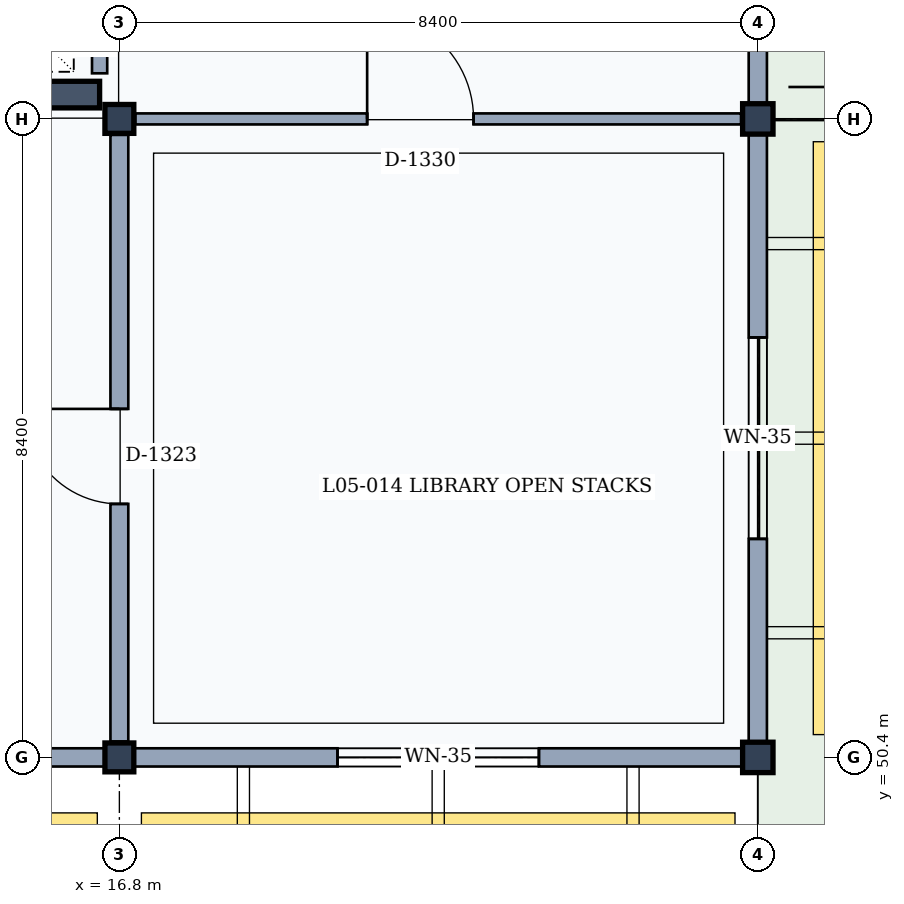
"""IFC4 building model, lengths in metres.
Left out: names, types, materials, properties, quantities, classifications, styles, units other than length and angle.
Written with IfcOpenShell. Run it as: python <this file> out.ifc"""

import sys

from ifc_helpers import new_model, si_unit, direction, frame, frame_2d, origin, origin_2d, place, context, subcontext, project, spatial, rectangle, extrude, element, fill, save


model = new_model("IFC4")
c1 = context("Model", 3, precision=1e-05, world=origin(), true_north=direction((0.0, 1.0)))
c2 = subcontext(c1, "Body", "Model", "MODEL_VIEW")
j1 = project(units=[si_unit("LENGTHUNIT", "METRE"), si_unit("PLANEANGLEUNIT", "RADIAN")], contexts=[c1])
p1 = place(None, origin())
s1 = spatial("IfcSite", under=j1, at=p1, CompositionType="ELEMENT")
p2 = place(p1, origin())
s2 = spatial("IfcBuilding", under=s1, at=p2, CompositionType="ELEMENT")
p3 = place(p2, frame((0.0, 0.0, 22.2)))
s3 = spatial("IfcBuildingStorey", under=s2, at=p3, CompositionType="ELEMENT", Elevation=22.2)
for number, where, z_axis, x_axis in (
    (1, (16.8, 50.4, 0.0), (0.0, 0.0, 1.0), (1.0, 0.0, 0.0)),
    (2, (16.8, 58.8, 0.0), (0.0, 0.0, 1.0), (1.0, 0.0, 0.0)),
):
    element("IfcColumn", number, at=place(p3, frame(where, z_axis=z_axis, x_axis=x_axis)), inside=s3, PredefinedType="COLUMN", context=c2, shape_type="SweptSolid", body=[
        extrude(rectangle(XDim=0.38, YDim=0.38, at=origin_2d()), origin(), (0.0, 0.0, 1.0), 4.2),
    ])
for number, where, z_axis, x_axis in (
    (3, (25.2, 50.4, 0.0), (0.0, 0.0, 1.0), (1.0, 0.0, 0.0)),
    (4, (25.2, 58.8, 0.0), (0.0, 0.0, 1.0), (1.0, 0.0, 0.0)),
):
    element("IfcColumn", number, at=place(p3, frame(where, z_axis=z_axis, x_axis=x_axis)), inside=s3, PredefinedType="COLUMN", context=c2, shape_type="SweptSolid", body=[
        extrude(rectangle(XDim=0.4, YDim=0.4, at=origin_2d()), origin(), (0.0, 0.0, 1.0), 4.2),
    ])
p4 = place(p3, frame((16.61, 50.4, 0.0), z_axis=(0.0, 0.0, 1.0), x_axis=(-1.0, 0.0, 0.0)))
e5 = element("IfcWall", 5, at=p4, inside=s3, PredefinedType="SOLIDWALL", context=c2, shape_type="SweptSolid", body=[
    extrude(rectangle(XDim=8.01, YDim=0.24, at=frame_2d((4.005, 0.0))), origin(), (0.0, 0.0, 1.0), 3.36),
])
p5 = place(p4, frame((3.23, 0.0, 0.9)))
e6 = element("IfcOpeningElement", 6, at=p5, cuts=e5, PredefinedType="OPENING", context=c2, shape_type="SweptSolid", body=[
    extrude(rectangle(XDim=1.55, YDim=1.75, at=frame_2d((0.775, 0.875))), frame((0.0, 0.13, 0.0), z_axis=(0.0, -1.0, 0.0), x_axis=(1.0, 0.0, 0.0)), (0.0, 0.0, 1.0), 0.26),
])
p6 = place(p3, frame((25.0, 50.4, 0.0), z_axis=(0.0, 0.0, 1.0), x_axis=(-1.0, 0.0, 0.0)))
e7 = element("IfcWall", 7, at=p6, inside=s3, PredefinedType="SOLIDWALL", context=c2, shape_type="SweptSolid", body=[
    extrude(rectangle(XDim=8.01, YDim=0.24, at=frame_2d((4.005, 0.0))), origin(), (0.0, 0.0, 1.0), 3.36),
])
p7 = place(p6, frame((2.68, 0.0, 0.9)))
e8 = element("IfcOpeningElement", 8, at=p7, cuts=e7, PredefinedType="OPENING", context=c2, shape_type="SweptSolid", body=[
    extrude(rectangle(XDim=2.65, YDim=1.8, at=frame_2d((1.325, 0.9))), frame((0.0, 0.13, 0.0), z_axis=(0.0, -1.0, 0.0), x_axis=(1.0, 0.0, 0.0)), (0.0, 0.0, 1.0), 0.26),
])
p8 = place(p3, frame((25.2, 58.6, 0.0), z_axis=(0.0, 0.0, 1.0), x_axis=(0.0, -1.0, 0.0)))
e9 = element("IfcWall", 9, at=p8, inside=s3, PredefinedType="SOLIDWALL", context=c2, shape_type="SweptSolid", body=[
    extrude(rectangle(XDim=8.0, YDim=0.24, at=frame_2d((4.0, 0.0))), origin(), (0.0, 0.0, 1.0), 3.36),
])
p9 = place(p8, frame((2.675, 0.0, 0.9)))
e10 = element("IfcOpeningElement", 10, at=p9, cuts=e9, PredefinedType="OPENING", context=c2, shape_type="SweptSolid", body=[
    extrude(rectangle(XDim=2.65, YDim=1.8, at=frame_2d((1.325, 0.9))), frame((0.0, 0.13, 0.0), z_axis=(0.0, -1.0, 0.0), x_axis=(1.0, 0.0, 0.0)), (0.0, 0.0, 1.0), 0.26),
])
p10 = place(p3, frame((25.2, 67.0, 0.0), z_axis=(0.0, 0.0, 1.0), x_axis=(0.0, -1.0, 0.0)))
e11 = element("IfcWall", 11, at=p10, inside=s3, PredefinedType="SOLIDWALL", context=c2, shape_type="SweptSolid", body=[
    extrude(rectangle(XDim=8.0, YDim=0.24, at=frame_2d((4.0, 0.0))), origin(), (0.0, 0.0, 1.0), 3.36),
])
p11 = place(p10, frame((3.45, 0.0, 0.0)))
e12 = element("IfcOpeningElement", 12, at=p11, cuts=e11, PredefinedType="OPENING", context=c2, shape_type="SweptSolid", body=[
    extrude(rectangle(XDim=1.1, YDim=2.2, at=frame_2d((0.55, 1.1))), frame((0.0, 0.13, 0.0), z_axis=(0.0, -1.0, 0.0), x_axis=(1.0, 0.0, 0.0)), (0.0, 0.0, 1.0), 0.26),
])
p12 = place(p3, frame((16.54, 66.6, 0.0), z_axis=(0.0, 0.0, 1.0), x_axis=(0.0, -1.0, 0.0)))
e13 = element("IfcWall", 13, at=p12, inside=s3, PredefinedType="PARTITIONING", context=c2, shape_type="SweptSolid", body=[
    extrude(rectangle(XDim=7.2, YDim=0.2, at=frame_2d((3.6, 0.0))), origin(), (0.0, 0.0, 1.0), 3.32),
])
p13 = place(p12, frame((3.55, 0.0, 0.0)))
e14 = element("IfcOpeningElement", 14, at=p13, cuts=e13, PredefinedType="OPENING", context=c2, shape_type="SweptSolid", body=[
    extrude(rectangle(XDim=1.1, YDim=2.15, at=frame_2d((0.55, 1.075))), frame((0.0, 0.11, 0.0), z_axis=(0.0, -1.0, 0.0), x_axis=(1.0, 0.0, 0.0)), (0.0, 0.0, 1.0), 0.22),
])
p14 = place(p3, frame((16.54, 59.12, 0.0), z_axis=(0.0, 0.0, 1.0), x_axis=(-1.0, 0.0, 0.0)))
e15 = element("IfcWall", 15, at=p14, inside=s3, PredefinedType="SHEAR", context=c2, shape_type="SweptSolid", body=[
    extrude(rectangle(XDim=7.84, YDim=0.35, at=frame_2d((3.92, 0.0))), origin(), (0.0, 0.0, 1.0), 3.98),
])
p15 = place(p3, frame((16.8, 50.61, 0.0), z_axis=(0.0, 0.0, 1.0), x_axis=(0.0, 1.0, 0.0)))
e16 = element("IfcWall", 16, at=p15, inside=s3, PredefinedType="PARTITIONING", context=c2, shape_type="SweptSolid", body=[
    extrude(rectangle(XDim=7.98, YDim=0.235, at=frame_2d((3.99, 0.0))), origin(), (0.0, 0.0, 1.0), 3.32),
])
p16 = place(p15, frame((3.125, 0.0, 0.0)))
e17 = element("IfcOpeningElement", 17, at=p16, cuts=e16, PredefinedType="OPENING", context=c2, shape_type="SweptSolid", body=[
    extrude(rectangle(XDim=1.25, YDim=2.3, at=frame_2d((0.625, 1.15))), frame((0.0, 0.127, 0.0), z_axis=(0.0, -1.0, 0.0), x_axis=(1.0, 0.0, 0.0)), (0.0, 0.0, 1.0), 0.255),
])
p17 = place(p3, frame((17.01, 58.8, 0.0), z_axis=(0.0, 0.0, 1.0), x_axis=(1.0, 0.0, 0.0)))
e18 = element("IfcWall", 18, at=p17, inside=s3, PredefinedType="PARTITIONING", context=c2, shape_type="SweptSolid", body=[
    extrude(rectangle(XDim=7.97, YDim=0.145, at=frame_2d((3.985, 0.0))), origin(), (0.0, 0.0, 1.0), 3.32),
])
p18 = place(p17, frame((3.05, 0.0, 0.0)))
e19 = element("IfcOpeningElement", 19, at=p18, cuts=e18, PredefinedType="OPENING", context=c2, shape_type="SweptSolid", body=[
    extrude(rectangle(XDim=1.4, YDim=2.25, at=frame_2d((0.7, 1.125))), frame((0.0, 0.083, 0.0), z_axis=(0.0, -1.0, 0.0), x_axis=(1.0, 0.0, 0.0)), (0.0, 0.0, 1.0), 0.165),
])
p19 = place(p7, origin())
e20 = element("IfcWindow", 20, at=p19, inside=s3, PartitioningType="SINGLE_PANEL", PredefinedType="WINDOW", context=c2, shape_type="SweptSolid", body=[
    extrude(rectangle(XDim=2.65, YDim=1.8, at=frame_2d((1.325, 0.9))), frame((0.0, 0.03, 0.0), z_axis=(0.0, -1.0, 0.0), x_axis=(1.0, 0.0, 0.0)), (0.0, 0.0, 1.0), 0.06),
])
fill(e8, e20)
p20 = place(p9, origin())
e21 = element("IfcWindow", 21, at=p20, inside=s3, PartitioningType="SINGLE_PANEL", PredefinedType="WINDOW", context=c2, shape_type="SweptSolid", body=[
    extrude(rectangle(XDim=2.65, YDim=1.8, at=frame_2d((1.325, 0.9))), frame((0.0, 0.03, 0.0), z_axis=(0.0, -1.0, 0.0), x_axis=(1.0, 0.0, 0.0)), (0.0, 0.0, 1.0), 0.06),
])
fill(e10, e21)
p21 = place(p16, origin())
e22 = element("IfcDoor", 22, at=p21, inside=s3, OperationType="SINGLE_SWING_RIGHT", PredefinedType="DOOR", context=c2, shape_type="SweptSolid", body=[
    extrude(rectangle(XDim=1.25, YDim=2.3, at=frame_2d((0.625, 1.15))), frame((0.0, 0.025, 0.0), z_axis=(0.0, -1.0, 0.0), x_axis=(1.0, 0.0, 0.0)), (0.0, 0.0, 1.0), 0.05),
])
fill(e17, e22)
p22 = place(p18, origin())
e23 = element("IfcDoor", 23, at=p22, inside=s3, OperationType="SINGLE_SWING_LEFT", PredefinedType="DOOR", context=c2, shape_type="SweptSolid", body=[
    extrude(rectangle(XDim=1.4, YDim=2.25, at=frame_2d((0.7, 1.125))), frame((0.0, 0.025, 0.0), z_axis=(0.0, -1.0, 0.0), x_axis=(1.0, 0.0, 0.0)), (0.0, 0.0, 1.0), 0.05),
])
fill(e19, e23)
save(model, sys.argv[1])
